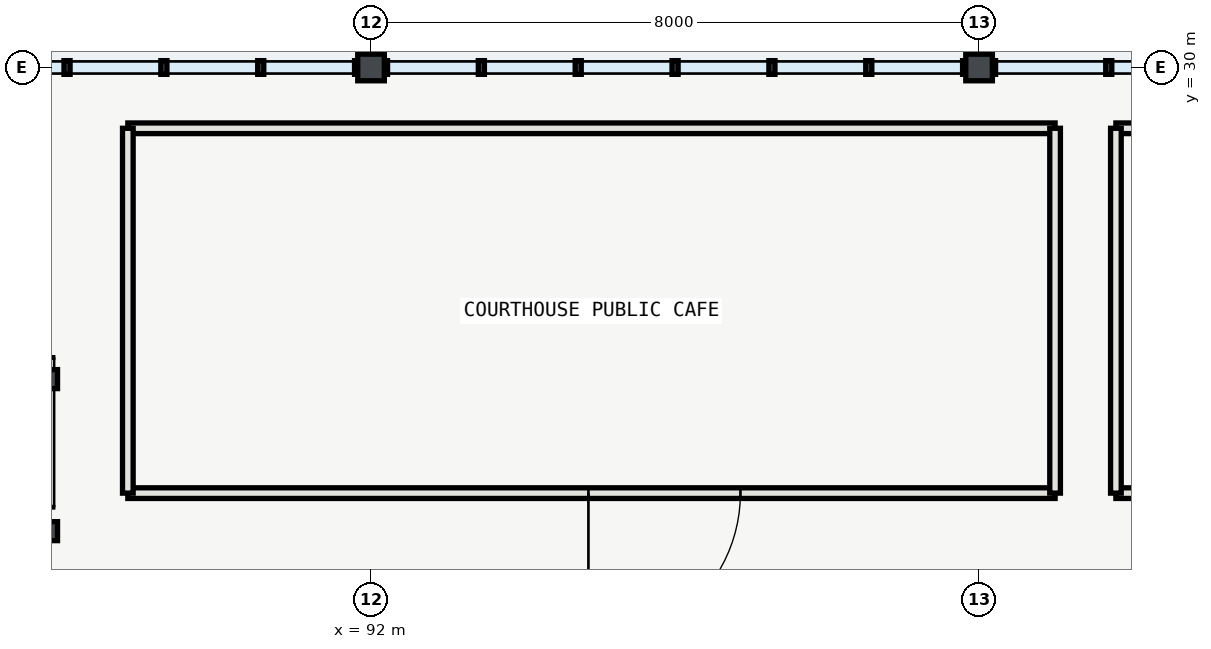
"""IFC4 building model, lengths in metres.
Left out: names, types, materials, properties, quantities, classifications, styles, units other than length and angle.
Written with IfcOpenShell. Run it as: python <this file> out.ifc"""

import sys

from ifc_helpers import new_model, si_unit, direction, frame, frame_2d, origin, origin_2d, place, context, subcontext, project, spatial, rectangle, i_section, extrude, element, fill, save


model = new_model("IFC4")
c1 = context("Model", 3, precision=1e-05, world=origin(), true_north=direction((0.0, 1.0)))
c2 = subcontext(c1, "Body", "Model", "MODEL_VIEW")
j1 = project(units=[si_unit("LENGTHUNIT", "METRE"), si_unit("PLANEANGLEUNIT", "RADIAN")], contexts=[c1])
p1 = place(None, origin())
s1 = spatial("IfcSite", under=j1, at=p1, CompositionType="ELEMENT")
p2 = place(p1, origin())
s2 = spatial("IfcBuilding", under=s1, at=p2, CompositionType="ELEMENT")
p3 = place(p2, origin())
s3 = spatial("IfcBuildingStorey", under=s2, at=p3, CompositionType="ELEMENT", Elevation=0.0)
for number, where, z_axis, x_axis in (
    (1, (92.0, 30.0, 0.0), (0.0, 0.0, 1.0), (1.0, 0.0, 0.0)),
    (2, (100.0, 30.0, 0.0), (0.0, 0.0, 1.0), (1.0, 0.0, 0.0)),
):
    element("IfcColumn", number, at=place(p3, frame(where, z_axis=z_axis, x_axis=x_axis)), inside=s3, PredefinedType="COLUMN", context=c2, shape_type="SweptSolid", body=[
        extrude(i_section(OverallWidth=0.35, OverallDepth=0.35, WebThickness=0.012, FlangeThickness=0.019, FilletRadius=0.02, at=origin_2d()), origin(), (0.0, 0.0, 1.0), 5.4),
    ])
p4 = place(p3, frame((88.8, 24.4, 0.0), z_axis=(0.0, 0.0, 1.0), x_axis=(1.0, 0.0, 0.0)))
e3 = element("IfcWall", 3, at=p4, inside=s3, PredefinedType="PARTITIONING", context=c2, shape_type="SweptSolid", body=[
    extrude(rectangle(XDim=12.2, YDim=0.14, at=frame_2d((6.1, 0.0))), origin(), (0.0, 0.0, 1.0), 5.12),
])
p5 = place(p4, frame((6.06, 0.0, 0.0)))
e4 = element("IfcOpeningElement", 4, at=p5, cuts=e3, PredefinedType="OPENING", context=c2, shape_type="SweptSolid", body=[
    extrude(rectangle(XDim=2.0, YDim=2.4, at=frame_2d((1.0, 1.2))), frame((0.0, 0.08, 0.0), z_axis=(0.0, -1.0, 0.0), x_axis=(1.0, 0.0, 0.0)), (0.0, 0.0, 1.0), 0.16),
])
p6 = place(p3, frame((101.0, 29.2, 0.0), z_axis=(0.0, 0.0, 1.0), x_axis=(-1.0, 0.0, 0.0)))
e5 = element("IfcWall", 5, at=p6, inside=s3, PredefinedType="PARTITIONING", context=c2, shape_type="SweptSolid", body=[
    extrude(rectangle(XDim=12.2, YDim=0.14, at=frame_2d((6.1, 0.0))), origin(), (0.0, 0.0, 1.0), 5.12),
])
for number, where, z_axis, x_axis in (
    (6, (88.8, 29.2, 0.0), (0.0, 0.0, 1.0), (0.0, -1.0, 0.0)),
    (7, (101.0, 24.4, 0.0), (0.0, 0.0, 1.0), (0.0, 1.0, 0.0)),
):
    element("IfcWall", number, at=place(p3, frame(where, z_axis=z_axis, x_axis=x_axis)), inside=s3, PredefinedType="PARTITIONING", context=c2, shape_type="SweptSolid", body=[
        extrude(rectangle(XDim=4.8, YDim=0.14, at=frame_2d((2.4, 0.0))), origin(), (0.0, 0.0, 1.0), 5.12),
    ])
p7 = place(p3, frame((101.8, 24.4, 0.0), z_axis=(0.0, 0.0, 1.0), x_axis=(1.0, 0.0, 0.0)))
e8 = element("IfcWall", 8, at=p7, inside=s3, PredefinedType="PARTITIONING", context=c2, shape_type="SweptSolid", body=[
    extrude(rectangle(XDim=11.8, YDim=0.14, at=frame_2d((5.9, 0.0))), origin(), (0.0, 0.0, 1.0), 5.12),
])
p8 = place(p7, frame((1.22, 0.0, 0.0)))
e9 = element("IfcOpeningElement", 9, at=p8, cuts=e8, PredefinedType="OPENING", context=c2, shape_type="SweptSolid", body=[
    extrude(rectangle(XDim=2.0, YDim=2.4, at=frame_2d((1.0, 1.2))), frame((0.0, 0.08, 0.0), z_axis=(0.0, -1.0, 0.0), x_axis=(1.0, 0.0, 0.0)), (0.0, 0.0, 1.0), 0.16),
])
p9 = place(p3, frame((113.6, 29.2, 0.0), z_axis=(0.0, 0.0, 1.0), x_axis=(-1.0, 0.0, 0.0)))
e10 = element("IfcWall", 10, at=p9, inside=s3, PredefinedType="PARTITIONING", context=c2, shape_type="SweptSolid", body=[
    extrude(rectangle(XDim=11.8, YDim=0.14, at=frame_2d((5.9, 0.0))), origin(), (0.0, 0.0, 1.0), 5.12),
])
p10 = place(p3, frame((101.8, 29.2, 0.0), z_axis=(0.0, 0.0, 1.0), x_axis=(0.0, -1.0, 0.0)))
e11 = element("IfcWall", 11, at=p10, inside=s3, PredefinedType="PARTITIONING", context=c2, shape_type="SweptSolid", body=[
    extrude(rectangle(XDim=4.8, YDim=0.14, at=frame_2d((2.4, 0.0))), origin(), (0.0, 0.0, 1.0), 5.12),
])
for number, where, z_axis, x_axis in (
    (12, (87.75, 23.9, 0.0), (0.0, 0.0, 1.0), (1.0, 0.0, 0.0)),
    (13, (87.75, 25.9, 0.0), (0.0, 0.0, 1.0), (1.0, 0.0, 0.0)),
):
    element("IfcColumn", number, at=place(p3, frame(where, z_axis=z_axis, x_axis=x_axis)), inside=s3, PredefinedType="COLUMN", context=c2, shape_type="SweptSolid", body=[
        extrude(i_section(OverallWidth=0.25, OverallDepth=0.25, WebThickness=0.009, FlangeThickness=0.014, FilletRadius=0.016, at=origin_2d()), origin(), (0.0, 0.0, 1.0), 5.14),
    ])
p11 = place(p5, origin())
e14 = element("IfcDoor", 14, at=p11, inside=s3, OperationType="DOUBLE_DOOR_SINGLE_SWING", PredefinedType="DOOR", context=c2, shape_type="SweptSolid", body=[
    extrude(rectangle(XDim=2.0, YDim=2.4, at=frame_2d((1.0, 1.2))), frame((0.0, 0.025, 0.0), z_axis=(0.0, -1.0, 0.0), x_axis=(1.0, 0.0, 0.0)), (0.0, 0.0, 1.0), 0.05),
])
fill(e4, e14)
save(model, sys.argv[1])
